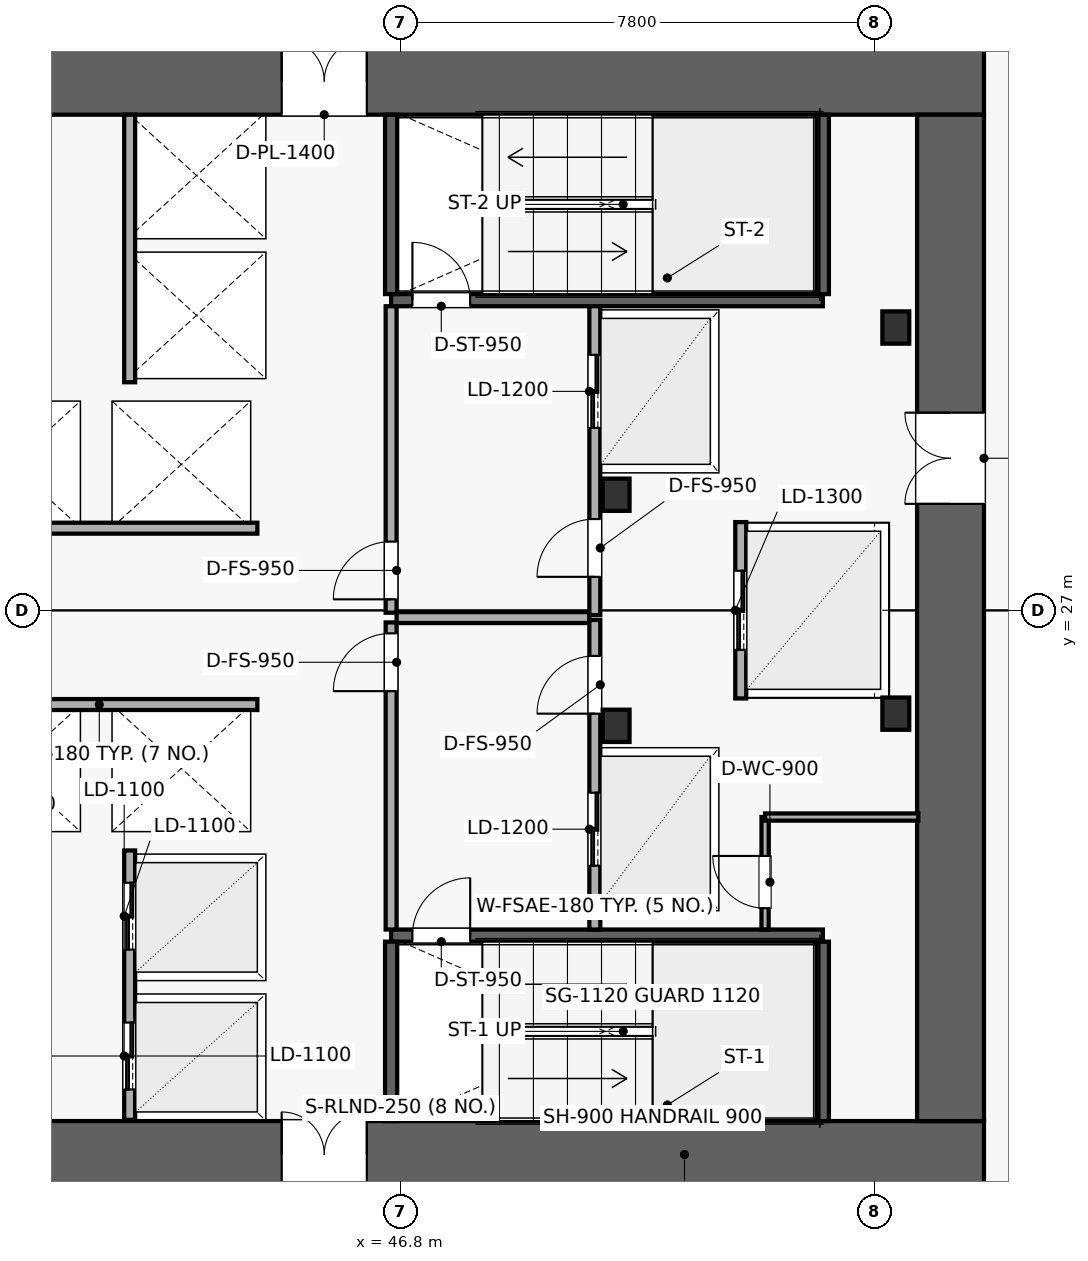
"""IFC4 building model, lengths in metres.
Left out: names, types, materials, properties, quantities, classifications, styles, units other than length and angle.
Written with IfcOpenShell. Run it as: python <this file> out.ifc"""

import sys

from ifc_helpers import new_model, si_unit, direction, frame, frame_2d, origin, origin_2d, place, context, subcontext, project, spatial, rectangle, i_section, extrude, element, fill, save


model = new_model("IFC4")
c1 = context("Model", 3, precision=1e-05, world=origin(), true_north=direction((0.0, 1.0)))
c2 = subcontext(c1, "Body", "Model", "MODEL_VIEW")
j1 = project(units=[si_unit("LENGTHUNIT", "METRE"), si_unit("PLANEANGLEUNIT", "RADIAN")], contexts=[c1])
p1 = place(None, origin())
s1 = spatial("IfcSite", under=j1, at=p1, CompositionType="ELEMENT")
p2 = place(p1, origin())
s2 = spatial("IfcBuilding", under=s1, at=p2, CompositionType="ELEMENT")
p3 = place(p2, frame((0.0, 0.0, 24.0)))
s3 = spatial("IfcBuildingStorey", under=s2, at=p3, CompositionType="ELEMENT", Elevation=24.0)
p4 = place(p3, frame((37.2, 18.05, 0.0), z_axis=(0.0, 0.0, 1.0), x_axis=(1.0, 0.0, 0.0)))
e1 = element("IfcWall", 1, at=p4, inside=s3, PredefinedType="SHEAR", context=c2, shape_type="SweptSolid", body=[
    extrude(rectangle(XDim=19.2, YDim=1.1, at=frame_2d((9.6, 0.0))), origin(), (0.0, 0.0, 1.0), 3.58),
])
p5 = place(p4, frame((7.65, 0.0, 0.0)))
e2 = element("IfcOpeningElement", 2, at=p5, cuts=e1, PredefinedType="OPENING", context=c2, shape_type="SweptSolid", body=[
    extrude(rectangle(XDim=1.4, YDim=2.15, at=frame_2d((0.7, 1.075))), frame((0.0, 0.56, 0.0), z_axis=(0.0, -1.0, 0.0), x_axis=(1.0, 0.0, 0.0)), (0.0, 0.0, 1.0), 1.12),
])
p6 = place(p3, frame((37.2, 35.7, 0.0), z_axis=(0.0, 0.0, 1.0), x_axis=(1.0, 0.0, 0.0)))
e3 = element("IfcWall", 3, at=p6, inside=s3, PredefinedType="SHEAR", context=c2, shape_type="SweptSolid", body=[
    extrude(rectangle(XDim=19.2, YDim=1.1, at=frame_2d((9.6, 0.0))), origin(), (0.0, 0.0, 1.0), 3.58),
])
p7 = place(p6, frame((7.65, 0.0, 0.0)))
e4 = element("IfcOpeningElement", 4, at=p7, cuts=e3, PredefinedType="OPENING", context=c2, shape_type="SweptSolid", body=[
    extrude(rectangle(XDim=1.4, YDim=2.15, at=frame_2d((0.7, 1.075))), frame((0.0, 0.56, 0.0), z_axis=(0.0, -1.0, 0.0), x_axis=(1.0, 0.0, 0.0)), (0.0, 0.0, 1.0), 1.12),
])
p8 = place(p3, frame((55.85, 18.6, 0.0), z_axis=(0.0, 0.0, 1.0), x_axis=(0.0, 1.0, 0.0)))
e5 = element("IfcWall", 5, at=p8, inside=s3, PredefinedType="SHEAR", context=c2, shape_type="SweptSolid", body=[
    extrude(rectangle(XDim=16.55, YDim=1.1, at=frame_2d((8.275, 0.0))), origin(), (0.0, 0.0, 1.0), 3.58),
])
p9 = place(p8, frame((10.15, 0.0, 0.0)))
e6 = element("IfcOpeningElement", 6, at=p9, cuts=e5, PredefinedType="OPENING", context=c2, shape_type="SweptSolid", body=[
    extrude(rectangle(XDim=1.5, YDim=2.15, at=frame_2d((0.75, 1.075))), frame((0.0, 0.56, 0.0), z_axis=(0.0, -1.0, 0.0), x_axis=(1.0, 0.0, 0.0)), (0.0, 0.0, 1.0), 1.12),
])
for number, where, z_axis, x_axis in (
    (7, (50.35, 25.1, 0.005), (0.0, 0.0, 1.0), (1.0, 0.0, 0.0)),
    (8, (50.35, 28.9, 0.005), (0.0, 0.0, 1.0), (1.0, 0.0, 0.0)),
    (9, (54.95, 25.3, 0.005), (0.0, 0.0, 1.0), (1.0, 0.0, 0.0)),
    (10, (54.95, 31.65, 0.005), (0.0, 0.0, 1.0), (1.0, 0.0, 0.0)),
):
    element("IfcColumn", number, at=place(p3, frame(where, z_axis=z_axis, x_axis=x_axis)), inside=s3, PredefinedType="COLUMN", context=c2, shape_type="SweptSolid", body=[
        extrude(i_section(OverallWidth=0.442, OverallDepth=0.531, WebThickness=0.066, FlangeThickness=0.106, FilletRadius=0.031, at=origin_2d()), origin(), (0.0, 0.0, 1.0), 3.795),
    ])
p10 = place(p3, frame((46.65, 21.65, 0.0), z_axis=(0.0, 0.0, 1.0), x_axis=(1.0, 0.0, 0.0)))
e11 = element("IfcWall", 11, at=p10, inside=s3, PredefinedType="SHEAR", context=c2, shape_type="SweptSolid", body=[
    extrude(rectangle(XDim=7.1, YDim=0.2, at=frame_2d((3.55, 0.0))), origin(), (0.0, 0.0, 1.0), 3.58),
])
p11 = place(p10, frame((0.35, 0.0, 0.0)))
e12 = element("IfcOpeningElement", 12, at=p11, cuts=e11, PredefinedType="OPENING", context=c2, shape_type="SweptSolid", body=[
    extrude(rectangle(XDim=0.95, YDim=2.1, at=frame_2d((0.475, 1.05))), frame((0.0, 0.11, 0.0), z_axis=(0.0, -1.0, 0.0), x_axis=(1.0, 0.0, 0.0)), (0.0, 0.0, 1.0), 0.22),
])
for number, where, z_axis, x_axis in (
    (13, (46.65, 18.6, 0.0), (0.0, 0.0, 1.0), (0.0, 1.0, 0.0)),
    (14, (53.75, 18.6, 0.0), (0.0, 0.0, 1.0), (0.0, 1.0, 0.0)),
):
    element("IfcWall", number, at=place(p3, frame(where, z_axis=z_axis, x_axis=x_axis)), inside=s3, PredefinedType="SHEAR", context=c2, shape_type="SweptSolid", body=[
        extrude(rectangle(XDim=2.95, YDim=0.2, at=frame_2d((1.475, 0.0))), origin(), (0.0, 0.0, 1.0), 3.58),
    ])
p12 = place(p3, frame((46.65, 32.1, 0.0), z_axis=(0.0, 0.0, 1.0), x_axis=(1.0, 0.0, 0.0)))
e15 = element("IfcWall", 15, at=p12, inside=s3, PredefinedType="SHEAR", context=c2, shape_type="SweptSolid", body=[
    extrude(rectangle(XDim=7.1, YDim=0.2, at=frame_2d((3.55, 0.0))), origin(), (0.0, 0.0, 1.0), 3.58),
])
p13 = place(p12, frame((0.35, 0.0, 0.0)))
e16 = element("IfcOpeningElement", 16, at=p13, cuts=e15, PredefinedType="OPENING", context=c2, shape_type="SweptSolid", body=[
    extrude(rectangle(XDim=0.95, YDim=2.1, at=frame_2d((0.475, 1.05))), frame((0.0, 0.11, 0.0), z_axis=(0.0, -1.0, 0.0), x_axis=(1.0, 0.0, 0.0)), (0.0, 0.0, 1.0), 0.22),
])
for number, where, z_axis, x_axis in (
    (17, (46.65, 32.2, 0.0), (0.0, 0.0, 1.0), (0.0, 1.0, 0.0)),
    (18, (53.75, 32.2, 0.0), (0.0, 0.0, 1.0), (0.0, 1.0, 0.0)),
):
    element("IfcWall", number, at=place(p3, frame(where, z_axis=z_axis, x_axis=x_axis)), inside=s3, PredefinedType="SHEAR", context=c2, shape_type="SweptSolid", body=[
        extrude(rectangle(XDim=2.95, YDim=0.2, at=frame_2d((1.475, 0.0))), origin(), (0.0, 0.0, 1.0), 3.58),
    ])
p14 = place(p3, frame((46.74, 26.88, 0.0), z_axis=(0.0, 0.0, 1.0), x_axis=(1.0, 0.0, 0.0)))
e19 = element("IfcWall", 19, at=p14, inside=s3, PredefinedType="PARTITIONING", context=c2, shape_type="SweptSolid", body=[
    extrude(rectangle(XDim=3.17, YDim=0.18, at=frame_2d((1.585, 0.0))), origin(), (0.0, 0.0, 1.0), 3.58),
])
p15 = place(p3, frame((46.65, 21.75, 0.0), z_axis=(0.0, 0.0, 1.0), x_axis=(0.0, 1.0, 0.0)))
e20 = element("IfcWall", 20, at=p15, inside=s3, PredefinedType="PARTITIONING", context=c2, shape_type="SweptSolid", body=[
    extrude(rectangle(XDim=5.05, YDim=0.18, at=frame_2d((2.525, 0.0))), origin(), (0.0, 0.0, 1.0), 2.958),
])
p16 = place(p15, frame((3.92, 0.0, 0.0)))
e21 = element("IfcOpeningElement", 21, at=p16, cuts=e20, PredefinedType="OPENING", context=c2, shape_type="SweptSolid", body=[
    extrude(rectangle(XDim=0.95, YDim=2.1, at=frame_2d((0.475, 1.05))), frame((0.0, 0.1, 0.0), z_axis=(0.0, -1.0, 0.0), x_axis=(1.0, 0.0, 0.0)), (0.0, 0.0, 1.0), 0.2),
])
p17 = place(p3, frame((46.65, 26.96, 0.0), z_axis=(0.0, 0.0, 1.0), x_axis=(0.0, 1.0, 0.0)))
e22 = element("IfcWall", 22, at=p17, inside=s3, PredefinedType="PARTITIONING", context=c2, shape_type="SweptSolid", body=[
    extrude(rectangle(XDim=5.04, YDim=0.18, at=frame_2d((2.52, 0.0))), origin(), (0.0, 0.0, 1.0), 2.958),
])
p18 = place(p17, frame((0.22, 0.0, 0.0)))
e23 = element("IfcOpeningElement", 23, at=p18, cuts=e22, PredefinedType="OPENING", context=c2, shape_type="SweptSolid", body=[
    extrude(rectangle(XDim=0.95, YDim=2.1, at=frame_2d((0.475, 1.05))), frame((0.0, 0.1, 0.0), z_axis=(0.0, -1.0, 0.0), x_axis=(1.0, 0.0, 0.0)), (0.0, 0.0, 1.0), 0.2),
])
p19 = place(p3, frame((50.0, 21.75, 0.0), z_axis=(0.0, 0.0, 1.0), x_axis=(0.0, 1.0, 0.0)))
e24 = element("IfcWall", 24, at=p19, inside=s3, PredefinedType="PARTITIONING", context=c2, shape_type="SweptSolid", body=[
    extrude(rectangle(XDim=5.09, YDim=0.18, at=frame_2d((2.545, 0.0))), origin(), (0.0, 0.0, 1.0), 2.958),
])
p20 = place(p19, frame((1.05, 0.0, 0.0)))
e25 = element("IfcOpeningElement", 25, at=p20, cuts=e24, PredefinedType="OPENING", context=c2, shape_type="SweptSolid", body=[
    extrude(rectangle(XDim=1.2, YDim=2.15, at=frame_2d((0.6, 1.075))), frame((0.0, 0.1, 0.0), z_axis=(0.0, -1.0, 0.0), x_axis=(1.0, 0.0, 0.0)), (0.0, 0.0, 1.0), 0.2),
])
p21 = place(p19, frame((3.55, 0.0, 0.0)))
e26 = element("IfcOpeningElement", 26, at=p21, cuts=e24, PredefinedType="OPENING", context=c2, shape_type="SweptSolid", body=[
    extrude(rectangle(XDim=0.95, YDim=2.1, at=frame_2d((0.475, 1.05))), frame((0.0, 0.1, 0.0), z_axis=(0.0, -1.0, 0.0), x_axis=(1.0, 0.0, 0.0)), (0.0, 0.0, 1.0), 0.2),
])
p22 = place(p3, frame((50.0, 26.92, 0.0), z_axis=(0.0, 0.0, 1.0), x_axis=(0.0, 1.0, 0.0)))
e27 = element("IfcWall", 27, at=p22, inside=s3, PredefinedType="PARTITIONING", context=c2, shape_type="SweptSolid", body=[
    extrude(rectangle(XDim=5.08, YDim=0.18, at=frame_2d((2.54, 0.0))), origin(), (0.0, 0.0, 1.0), 2.958),
])
p23 = place(p22, frame((3.08, 0.0, 0.0)))
e28 = element("IfcOpeningElement", 28, at=p23, cuts=e27, PredefinedType="OPENING", context=c2, shape_type="SweptSolid", body=[
    extrude(rectangle(XDim=1.2, YDim=2.15, at=frame_2d((0.6, 1.075))), frame((0.0, 0.1, 0.0), z_axis=(0.0, -1.0, 0.0), x_axis=(1.0, 0.0, 0.0)), (0.0, 0.0, 1.0), 0.2),
])
p24 = place(p22, frame((0.63, 0.0, 0.0)))
e29 = element("IfcOpeningElement", 29, at=p24, cuts=e27, PredefinedType="OPENING", context=c2, shape_type="SweptSolid", body=[
    extrude(rectangle(XDim=0.95, YDim=2.1, at=frame_2d((0.475, 1.05))), frame((0.0, 0.1, 0.0), z_axis=(0.0, -1.0, 0.0), x_axis=(1.0, 0.0, 0.0)), (0.0, 0.0, 1.0), 0.2),
])
p25 = place(p3, frame((52.4, 25.55, 0.0), z_axis=(0.0, 0.0, 1.0), x_axis=(0.0, 1.0, 0.0)))
e30 = element("IfcWall", 30, at=p25, inside=s3, PredefinedType="SOLIDWALL", context=c2, shape_type="SweptSolid", body=[
    extrude(rectangle(XDim=2.9, YDim=0.18, at=frame_2d((1.45, 0.0))), origin(), (0.0, 0.0, 1.0), 3.58),
])
p26 = place(p25, frame((0.8, 0.0, 0.0)))
e31 = element("IfcOpeningElement", 31, at=p26, cuts=e30, PredefinedType="OPENING", context=c2, shape_type="SweptSolid", body=[
    extrude(rectangle(XDim=1.3, YDim=2.15, at=frame_2d((0.65, 1.075))), frame((0.0, 0.1, 0.0), z_axis=(0.0, -1.0, 0.0), x_axis=(1.0, 0.0, 0.0)), (0.0, 0.0, 1.0), 0.2),
])
p27 = place(p3, frame((42.35, 18.62, 0.0), z_axis=(0.0, 0.0, 1.0), x_axis=(0.0, 1.0, 0.0)))
e32 = element("IfcWall", 32, at=p27, inside=s3, PredefinedType="SOLIDWALL", context=c2, shape_type="SweptSolid", body=[
    extrude(rectangle(XDim=4.43, YDim=0.18, at=frame_2d((2.215, 0.0))), origin(), (0.0, 0.0, 1.0), 3.58),
])
p28 = place(p27, frame((0.5, 0.0, 0.0)))
e33 = element("IfcOpeningElement", 33, at=p28, cuts=e32, PredefinedType="OPENING", context=c2, shape_type="SweptSolid", body=[
    extrude(rectangle(XDim=1.1, YDim=2.15, at=frame_2d((0.55, 1.075))), frame((0.0, 0.1, 0.0), z_axis=(0.0, -1.0, 0.0), x_axis=(1.0, 0.0, 0.0)), (0.0, 0.0, 1.0), 0.2),
])
p29 = place(p27, frame((2.8, 0.0, 0.0)))
e34 = element("IfcOpeningElement", 34, at=p29, cuts=e32, PredefinedType="OPENING", context=c2, shape_type="SweptSolid", body=[
    extrude(rectangle(XDim=1.1, YDim=2.15, at=frame_2d((0.55, 1.075))), frame((0.0, 0.1, 0.0), z_axis=(0.0, -1.0, 0.0), x_axis=(1.0, 0.0, 0.0)), (0.0, 0.0, 1.0), 0.2),
])
p30 = place(p3, frame((42.35, 30.75, 0.0), z_axis=(0.0, 0.0, 1.0), x_axis=(0.0, 1.0, 0.0)))
e35 = element("IfcWall", 35, at=p30, inside=s3, PredefinedType="SOLIDWALL", context=c2, shape_type="SweptSolid", body=[
    extrude(rectangle(XDim=4.4, YDim=0.18, at=frame_2d((2.2, 0.0))), origin(), (0.0, 0.0, 1.0), 3.58),
])
for number, where, z_axis, x_axis in (
    (36, (39.25, 25.45, 0.0), (0.0, 0.0, 1.0), (1.0, 0.0, 0.0)),
    (37, (39.25, 28.35, 0.0), (0.0, 0.0, 1.0), (1.0, 0.0, 0.0)),
):
    element("IfcWall", number, at=place(p3, frame(where, z_axis=z_axis, x_axis=x_axis)), inside=s3, PredefinedType="SOLIDWALL", context=c2, shape_type="SweptSolid", body=[
        extrude(rectangle(XDim=5.2, YDim=0.18, at=frame_2d((2.6, 0.0))), origin(), (0.0, 0.0, 1.0), 3.58),
    ])
p31 = place(p3, frame((52.8, 21.75, 0.0), z_axis=(0.0, 0.0, 1.0), x_axis=(0.0, 1.0, 0.0)))
e38 = element("IfcWall", 38, at=p31, inside=s3, PredefinedType="PARTITIONING", context=c2, shape_type="SweptSolid", body=[
    extrude(rectangle(XDim=1.85, YDim=0.118, at=frame_2d((0.925, 0.0))), origin(), (0.0, 0.0, 1.0), 3.28),
])
p32 = place(p31, frame((0.35, 0.0, 0.0)))
e39 = element("IfcOpeningElement", 39, at=p32, cuts=e38, PredefinedType="OPENING", context=c2, shape_type="SweptSolid", body=[
    extrude(rectangle(XDim=0.86, YDim=2.05, at=frame_2d((0.43, 1.025))), frame((0.0, 0.069, 0.0), z_axis=(0.0, -1.0, 0.0), x_axis=(1.0, 0.0, 0.0)), (0.0, 0.0, 1.0), 0.138),
])
p33 = place(p3, frame((52.8, 23.6, 0.0), z_axis=(0.0, 0.0, 1.0), x_axis=(1.0, 0.0, 0.0)))
e40 = element("IfcWall", 40, at=p33, inside=s3, PredefinedType="PARTITIONING", context=c2, shape_type="SweptSolid", body=[
    extrude(rectangle(XDim=2.52, YDim=0.118, at=frame_2d((1.26, 0.0))), origin(), (0.0, 0.0, 1.0), 3.28),
])
p34 = place(p11, origin())
e41 = element("IfcDoor", 41, at=p34, inside=s3, OperationType="SINGLE_SWING_RIGHT", PredefinedType="DOOR", context=c2, shape_type="SweptSolid", body=[
    extrude(rectangle(XDim=0.95, YDim=2.1, at=frame_2d((0.475, 1.05))), frame((0.0, 0.025, 0.0), z_axis=(0.0, -1.0, 0.0), x_axis=(1.0, 0.0, 0.0)), (0.0, 0.0, 1.0), 0.05),
])
fill(e12, e41)
p35 = place(p13, origin())
e42 = element("IfcDoor", 42, at=p35, inside=s3, OperationType="SINGLE_SWING_LEFT", PredefinedType="DOOR", context=c2, shape_type="SweptSolid", body=[
    extrude(rectangle(XDim=0.95, YDim=2.1, at=frame_2d((0.475, 1.05))), frame((0.0, 0.025, 0.0), z_axis=(0.0, -1.0, 0.0), x_axis=(1.0, 0.0, 0.0)), (0.0, 0.0, 1.0), 0.05),
])
fill(e16, e42)
p36 = place(p16, origin())
e43 = element("IfcDoor", 43, at=p36, inside=s3, OperationType="SINGLE_SWING_LEFT", PredefinedType="DOOR", context=c2, shape_type="SweptSolid", body=[
    extrude(rectangle(XDim=0.95, YDim=2.1, at=frame_2d((0.475, 1.05))), frame((0.0, 0.025, 0.0), z_axis=(0.0, -1.0, 0.0), x_axis=(1.0, 0.0, 0.0)), (0.0, 0.0, 1.0), 0.05),
])
fill(e21, e43)
p37 = place(p18, origin())
e44 = element("IfcDoor", 44, at=p37, inside=s3, OperationType="SINGLE_SWING_LEFT", PredefinedType="DOOR", context=c2, shape_type="SweptSolid", body=[
    extrude(rectangle(XDim=0.95, YDim=2.1, at=frame_2d((0.475, 1.05))), frame((0.0, 0.025, 0.0), z_axis=(0.0, -1.0, 0.0), x_axis=(1.0, 0.0, 0.0)), (0.0, 0.0, 1.0), 0.05),
])
fill(e23, e44)
p38 = place(p20, origin())
e45 = element("IfcDoor", 45, at=p38, inside=s3, OperationType="DOUBLE_DOOR_SLIDING", PredefinedType="DOOR", context=c2, shape_type="SweptSolid", body=[
    extrude(rectangle(XDim=1.2, YDim=2.15, at=frame_2d((0.6, 1.075))), frame((0.0, 0.025, 0.0), z_axis=(0.0, -1.0, 0.0), x_axis=(1.0, 0.0, 0.0)), (0.0, 0.0, 1.0), 0.05),
])
fill(e25, e45)
p39 = place(p21, origin())
e46 = element("IfcDoor", 46, at=p39, inside=s3, OperationType="SINGLE_SWING_LEFT", PredefinedType="DOOR", context=c2, shape_type="SweptSolid", body=[
    extrude(rectangle(XDim=0.95, YDim=2.1, at=frame_2d((0.475, 1.05))), frame((0.0, 0.025, 0.0), z_axis=(0.0, -1.0, 0.0), x_axis=(1.0, 0.0, 0.0)), (0.0, 0.0, 1.0), 0.05),
])
fill(e26, e46)
p40 = place(p23, origin())
e47 = element("IfcDoor", 47, at=p40, inside=s3, OperationType="DOUBLE_DOOR_SLIDING", PredefinedType="DOOR", context=c2, shape_type="SweptSolid", body=[
    extrude(rectangle(XDim=1.2, YDim=2.15, at=frame_2d((0.6, 1.075))), frame((0.0, 0.025, 0.0), z_axis=(0.0, -1.0, 0.0), x_axis=(1.0, 0.0, 0.0)), (0.0, 0.0, 1.0), 0.05),
])
fill(e28, e47)
p41 = place(p24, origin())
e48 = element("IfcDoor", 48, at=p41, inside=s3, OperationType="SINGLE_SWING_LEFT", PredefinedType="DOOR", context=c2, shape_type="SweptSolid", body=[
    extrude(rectangle(XDim=0.95, YDim=2.1, at=frame_2d((0.475, 1.05))), frame((0.0, 0.025, 0.0), z_axis=(0.0, -1.0, 0.0), x_axis=(1.0, 0.0, 0.0)), (0.0, 0.0, 1.0), 0.05),
])
fill(e29, e48)
p42 = place(p26, origin())
e49 = element("IfcDoor", 49, at=p42, inside=s3, OperationType="DOUBLE_DOOR_SLIDING", PredefinedType="DOOR", context=c2, shape_type="SweptSolid", body=[
    extrude(rectangle(XDim=1.3, YDim=2.15, at=frame_2d((0.65, 1.075))), frame((0.0, 0.025, 0.0), z_axis=(0.0, -1.0, 0.0), x_axis=(1.0, 0.0, 0.0)), (0.0, 0.0, 1.0), 0.05),
])
fill(e31, e49)
p43 = place(p9, origin())
e50 = element("IfcDoor", 50, at=p43, inside=s3, OperationType="DOUBLE_DOOR_SINGLE_SWING", PredefinedType="DOOR", context=c2, shape_type="SweptSolid", body=[
    extrude(rectangle(XDim=1.5, YDim=2.15, at=frame_2d((0.75, 1.075))), frame((0.0, 0.025, 0.0), z_axis=(0.0, -1.0, 0.0), x_axis=(1.0, 0.0, 0.0)), (0.0, 0.0, 1.0), 0.05),
])
fill(e6, e50)
p44 = place(p5, origin())
e51 = element("IfcDoor", 51, at=p44, inside=s3, OperationType="DOUBLE_DOOR_SINGLE_SWING", PredefinedType="DOOR", context=c2, shape_type="SweptSolid", body=[
    extrude(rectangle(XDim=1.4, YDim=2.15, at=frame_2d((0.7, 1.075))), frame((0.0, 0.025, 0.0), z_axis=(0.0, -1.0, 0.0), x_axis=(1.0, 0.0, 0.0)), (0.0, 0.0, 1.0), 0.05),
])
fill(e2, e51)
p45 = place(p7, origin())
e52 = element("IfcDoor", 52, at=p45, inside=s3, OperationType="DOUBLE_DOOR_SINGLE_SWING", PredefinedType="DOOR", context=c2, shape_type="SweptSolid", body=[
    extrude(rectangle(XDim=1.4, YDim=2.15, at=frame_2d((0.7, 1.075))), frame((0.0, 0.025, 0.0), z_axis=(0.0, -1.0, 0.0), x_axis=(1.0, 0.0, 0.0)), (0.0, 0.0, 1.0), 0.05),
])
fill(e4, e52)
p46 = place(p28, origin())
e53 = element("IfcDoor", 53, at=p46, inside=s3, OperationType="DOUBLE_DOOR_SLIDING", PredefinedType="DOOR", context=c2, shape_type="SweptSolid", body=[
    extrude(rectangle(XDim=1.1, YDim=2.15, at=frame_2d((0.55, 1.075))), frame((0.0, 0.025, 0.0), z_axis=(0.0, -1.0, 0.0), x_axis=(1.0, 0.0, 0.0)), (0.0, 0.0, 1.0), 0.05),
])
fill(e33, e53)
p47 = place(p29, origin())
e54 = element("IfcDoor", 54, at=p47, inside=s3, OperationType="DOUBLE_DOOR_SLIDING", PredefinedType="DOOR", context=c2, shape_type="SweptSolid", body=[
    extrude(rectangle(XDim=1.1, YDim=2.15, at=frame_2d((0.55, 1.075))), frame((0.0, 0.025, 0.0), z_axis=(0.0, -1.0, 0.0), x_axis=(1.0, 0.0, 0.0)), (0.0, 0.0, 1.0), 0.05),
])
fill(e34, e54)
p48 = place(p32, origin())
e55 = element("IfcDoor", 55, at=p48, inside=s3, OperationType="SINGLE_SWING_RIGHT", PredefinedType="DOOR", context=c2, shape_type="SweptSolid", body=[
    extrude(rectangle(XDim=0.86, YDim=2.05, at=frame_2d((0.43, 1.025))), frame((0.0, 0.025, 0.0), z_axis=(0.0, -1.0, 0.0), x_axis=(1.0, 0.0, 0.0)), (0.0, 0.0, 1.0), 0.05),
])
fill(e39, e55)
save(model, sys.argv[1])
